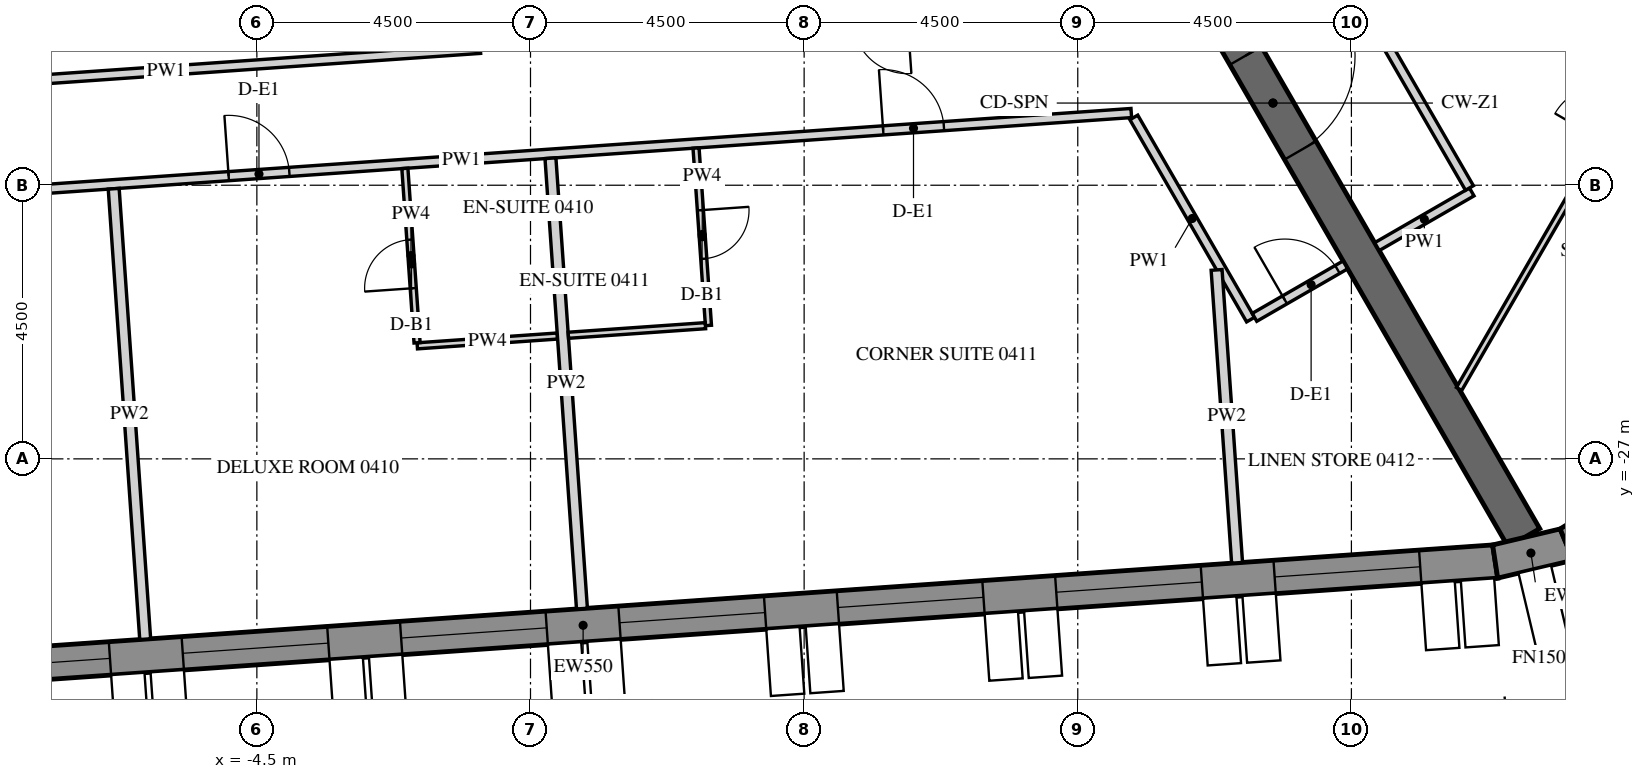
"""IFC4 building model, lengths in metres.
Left out: names, types, materials, properties, quantities, classifications, styles, units other than length and angle.
Written with IfcOpenShell. Run it as: python <this file> out.ifc"""

import sys

from ifc_helpers import new_model, si_unit, direction, frame, frame_2d, origin, place, context, subcontext, project, spatial, polyline, rectangle, outline, extrude, element, fill, save


model = new_model("IFC4")
c1 = context("Model", 3, precision=1e-05, world=origin(), true_north=direction((0.0, 1.0)))
c2 = subcontext(c1, "Body", "Model", "MODEL_VIEW")
j1 = project(units=[si_unit("LENGTHUNIT", "METRE"), si_unit("PLANEANGLEUNIT", "RADIAN")], contexts=[c1])
p1 = place(None, origin())
s1 = spatial("IfcSite", under=j1, at=p1, CompositionType="ELEMENT")
p2 = place(p1, origin())
s2 = spatial("IfcBuilding", under=s1, at=p2, CompositionType="ELEMENT")
p3 = place(p2, frame((0.0, 0.0, 68.7)))
s3 = spatial("IfcBuildingStorey", under=s2, at=p3, CompositionType="ELEMENT", Elevation=68.7)
p4 = place(p3, frame((-14.134, -30.786, -0.15), z_axis=(0.0, 0.0, 1.0), x_axis=(0.997564037441, 0.069756657061, 0.0)))
e1 = element("IfcWall", 1, at=p4, inside=s3, PredefinedType="SOLIDWALL", context=c2, shape_type="SweptSolid", body=[
    extrude(outline(polyline([(-0.026, -0.275), (30.094, -0.275), (30.049, 0.275), (0.026, 0.275), (-0.026, -0.275)])), origin(), (0.0, 0.0, 1.0), 3.9),
])
p5 = place(p4, frame((1.236, 0.0, 1.05)))
e2 = element("IfcOpeningElement", 2, at=p5, cuts=e1, PredefinedType="OPENING", context=c2, shape_type="SweptSolid", body=[
    extrude(rectangle(XDim=2.4, YDim=2.4, at=frame_2d((1.2, 1.2))), frame((0.0, 0.285, 0.0), z_axis=(0.0, -1.0, 0.0), x_axis=(1.0, 0.0, 0.0)), (0.0, 0.0, 1.0), 0.57),
])
p6 = place(p4, frame((4.835, 0.0, 1.05)))
e3 = element("IfcOpeningElement", 3, at=p6, cuts=e1, PredefinedType="OPENING", context=c2, shape_type="SweptSolid", body=[
    extrude(rectangle(XDim=2.4, YDim=2.4, at=frame_2d((1.2, 1.2))), frame((0.0, 0.285, 0.0), z_axis=(0.0, -1.0, 0.0), x_axis=(1.0, 0.0, 0.0)), (0.0, 0.0, 1.0), 0.57),
])
p7 = place(p4, frame((8.436, 0.0, 1.05)))
e4 = element("IfcOpeningElement", 4, at=p7, cuts=e1, PredefinedType="OPENING", context=c2, shape_type="SweptSolid", body=[
    extrude(rectangle(XDim=2.4, YDim=2.4, at=frame_2d((1.2, 1.2))), frame((0.0, 0.285, 0.0), z_axis=(0.0, -1.0, 0.0), x_axis=(1.0, 0.0, 0.0)), (0.0, 0.0, 1.0), 0.57),
])
p8 = place(p4, frame((12.035, 0.0, 1.05)))
e5 = element("IfcOpeningElement", 5, at=p8, cuts=e1, PredefinedType="OPENING", context=c2, shape_type="SweptSolid", body=[
    extrude(rectangle(XDim=2.4, YDim=2.4, at=frame_2d((1.2, 1.2))), frame((0.0, 0.285, 0.0), z_axis=(0.0, -1.0, 0.0), x_axis=(1.0, 0.0, 0.0)), (0.0, 0.0, 1.0), 0.57),
])
p9 = place(p4, frame((15.635, 0.0, 1.05)))
e6 = element("IfcOpeningElement", 6, at=p9, cuts=e1, PredefinedType="OPENING", context=c2, shape_type="SweptSolid", body=[
    extrude(rectangle(XDim=2.4, YDim=2.4, at=frame_2d((1.2, 1.2))), frame((0.0, 0.285, 0.0), z_axis=(0.0, -1.0, 0.0), x_axis=(1.0, 0.0, 0.0)), (0.0, 0.0, 1.0), 0.57),
])
p10 = place(p4, frame((19.236, 0.0, 1.05)))
e7 = element("IfcOpeningElement", 7, at=p10, cuts=e1, PredefinedType="OPENING", context=c2, shape_type="SweptSolid", body=[
    extrude(rectangle(XDim=2.4, YDim=2.4, at=frame_2d((1.2, 1.2))), frame((0.0, 0.285, 0.0), z_axis=(0.0, -1.0, 0.0), x_axis=(1.0, 0.0, 0.0)), (0.0, 0.0, 1.0), 0.57),
])
p11 = place(p4, frame((22.835, 0.0, 1.05)))
e8 = element("IfcOpeningElement", 8, at=p11, cuts=e1, PredefinedType="OPENING", context=c2, shape_type="SweptSolid", body=[
    extrude(rectangle(XDim=2.4, YDim=2.4, at=frame_2d((1.2, 1.2))), frame((0.0, 0.285, 0.0), z_axis=(0.0, -1.0, 0.0), x_axis=(1.0, 0.0, 0.0)), (0.0, 0.0, 1.0), 0.57),
])
p12 = place(p4, frame((26.436, 0.0, 1.05)))
e9 = element("IfcOpeningElement", 9, at=p12, cuts=e1, PredefinedType="OPENING", context=c2, shape_type="SweptSolid", body=[
    extrude(rectangle(XDim=2.4, YDim=2.4, at=frame_2d((1.2, 1.2))), frame((0.0, 0.285, 0.0), z_axis=(0.0, -1.0, 0.0), x_axis=(1.0, 0.0, 0.0)), (0.0, 0.0, 1.0), 0.57),
])
p13 = place(p3, frame((15.864, -28.688, -0.15), z_axis=(0.0, 0.0, 1.0), x_axis=(0.973063591128, 0.230536868247, 0.0)))
e10 = element("IfcWall", 10, at=p13, inside=s3, PredefinedType="SOLIDWALL", context=c2, shape_type="SweptSolid", body=[
    extrude(outline(polyline([(-0.022, -0.275), (1.253, -0.275), (1.163, 0.275), (0.022, 0.275), (-0.022, -0.275)])), origin(), (0.0, 0.0, 1.0), 3.9),
])
p14 = place(p3, frame((17.04, -28.41, -0.15), z_axis=(0.0, 0.0, 1.0), x_axis=(0.847952888306, 0.530071598195, 0.0)))
e11 = element("IfcWall", 11, at=p14, inside=s3, PredefinedType="SOLIDWALL", context=c2, shape_type="SweptSolid", body=[
    extrude(outline(polyline([(-0.045, -0.275), (1.253, -0.275), (1.163, 0.275), (0.045, 0.275), (-0.045, -0.275)])), origin(), (0.0, 0.0, 1.0), 3.9),
])
p15 = place(p3, frame((8.083, -14.0, -0.15), z_axis=(0.0, 0.0, 1.0), x_axis=(0.499997680643, -0.866026742862, 0.0)))
e12 = element("IfcWall", 12, at=p15, inside=s3, PredefinedType="SHEAR", context=c2, shape_type="SweptSolid", body=[
    extrude(rectangle(XDim=16.509, YDim=0.6, at=frame_2d((8.254, 0.0))), origin(), (0.0, 0.0, 1.0), 3.9),
])
p16 = place(p15, frame((7.354, 0.0, 0.15)))
e13 = element("IfcOpeningElement", 13, at=p16, cuts=e12, PredefinedType="OPENING", context=c2, shape_type="SweptSolid", body=[
    extrude(rectangle(XDim=1.8, YDim=2.4, at=frame_2d((0.9, 1.2))), frame((0.0, 0.31, 0.0), z_axis=(0.0, -1.0, 0.0), x_axis=(1.0, 0.0, 0.0)), (0.0, 0.0, 1.0), 0.62),
])
p17 = place(p3, frame((-12.151, -22.853, 0.0), z_axis=(0.0, 0.0, 1.0), x_axis=(0.99756425444, 0.069753553767, 0.0)))
e14 = element("IfcWall", 14, at=p17, inside=s3, PredefinedType="PARTITIONING", context=c2, shape_type="SweptSolid", body=[
    extrude(rectangle(XDim=22.085, YDim=0.15, at=frame_2d((11.042, 0.0))), origin(), (0.0, 0.0, 1.0), 2.988),
])
p18 = place(p17, frame((7.205, 0.0, 0.0)))
e15 = element("IfcOpeningElement", 15, at=p18, cuts=e14, PredefinedType="OPENING", context=c2, shape_type="SweptSolid", body=[
    extrude(rectangle(XDim=1.0, YDim=2.1, at=frame_2d((0.5, 1.05))), frame((0.0, 0.085, 0.0), z_axis=(0.0, -1.0, 0.0), x_axis=(1.0, 0.0, 0.0)), (0.0, 0.0, 1.0), 0.17),
])
p19 = place(p17, frame((17.995, 0.0, 0.0)))
e16 = element("IfcOpeningElement", 16, at=p19, cuts=e14, PredefinedType="OPENING", context=c2, shape_type="SweptSolid", body=[
    extrude(rectangle(XDim=1.0, YDim=2.1, at=frame_2d((0.5, 1.05))), frame((0.0, 0.085, 0.0), z_axis=(0.0, -1.0, 0.0), x_axis=(1.0, 0.0, 0.0)), (0.0, 0.0, 1.0), 0.17),
])
p20 = place(p3, frame((9.922, -21.385, 0.0), z_axis=(0.0, 0.0, 1.0), x_axis=(0.500023335103, -0.866011930837, 0.0)))
e17 = element("IfcWall", 17, at=p20, inside=s3, PredefinedType="PARTITIONING", context=c2, shape_type="SweptSolid", body=[
    extrude(rectangle(XDim=3.84, YDim=0.15, at=frame_2d((1.92, 0.0))), origin(), (0.0, 0.0, 1.0), 2.988),
])
p21 = place(p3, frame((11.906, -24.673, 0.0), z_axis=(0.0, 0.0, 1.0), x_axis=(0.866013532718, 0.500020560727, 0.0)))
e18 = element("IfcWall", 18, at=p21, inside=s3, PredefinedType="PARTITIONING", context=c2, shape_type="SweptSolid", body=[
    extrude(rectangle(XDim=1.725, YDim=0.15, at=frame_2d((0.863, 0.0))), origin(), (0.0, 0.0, 1.0), 2.988),
])
p22 = place(p21, frame((0.575, 0.0, 0.0)))
e19 = element("IfcOpeningElement", 19, at=p22, cuts=e18, PredefinedType="OPENING", context=c2, shape_type="SweptSolid", body=[
    extrude(rectangle(XDim=1.0, YDim=2.1, at=frame_2d((0.5, 1.05))), frame((0.0, 0.085, 0.0), z_axis=(0.0, -1.0, 0.0), x_axis=(1.0, 0.0, 0.0)), (0.0, 0.0, 1.0), 0.17),
])
p23 = place(p3, frame((-0.825, -20.257, 0.0), z_axis=(0.0, 0.0, 1.0), x_axis=(-0.9975635143, -0.069764137903, 0.0)))
e20 = element("IfcWall", 20, at=p23, inside=s3, PredefinedType="PARTITIONING", context=c2, shape_type="SweptSolid", body=[
    extrude(rectangle(XDim=10.355, YDim=0.15, at=frame_2d((5.177, 0.0))), origin(), (0.0, 0.0, 1.0), 2.988),
])
p24 = place(p3, frame((13.92, -23.51, 0.0), z_axis=(0.0, 0.0, 1.0), x_axis=(0.866047807691, 0.499961193289, 0.0)))
e21 = element("IfcWall", 21, at=p24, inside=s3, PredefinedType="PARTITIONING", context=c2, shape_type="SweptSolid", body=[
    extrude(rectangle(XDim=1.8, YDim=0.15, at=frame_2d((0.9, 0.0))), origin(), (0.0, 0.0, 1.0), 2.988),
])
p25 = place(p3, frame((15.441, -22.545, 0.0), z_axis=(0.0, 0.0, 1.0), x_axis=(-0.500037089193, 0.86600398927, 0.0)))
e22 = element("IfcWall", 22, at=p25, inside=s3, PredefinedType="PARTITIONING", context=c2, shape_type="SweptSolid", body=[
    extrude(rectangle(XDim=3.112, YDim=0.15, at=frame_2d((1.556, 0.0))), origin(), (0.0, 0.0, 1.0), 2.988),
])
p26 = place(p3, frame((-6.336, -29.965, 0.0), z_axis=(0.0, 0.0, 1.0), x_axis=(-0.06977252161, 0.997562927954, 0.0)))
e23 = element("IfcWall", 23, at=p26, inside=s3, PredefinedType="PARTITIONING", context=c2, shape_type="SweptSolid", body=[
    extrude(rectangle(XDim=7.425, YDim=0.18, at=frame_2d((3.712, 0.0))), origin(), (0.0, 0.0, 1.0), 2.988),
])
p27 = place(p3, frame((0.442, -24.98, 0.0), z_axis=(0.0, 0.0, 1.0), x_axis=(-0.997563824095, -0.069759707979, 0.0)))
e24 = element("IfcWall", 24, at=p27, inside=s3, PredefinedType="PARTITIONING", context=c2, shape_type="SweptSolid", body=[
    extrude(rectangle(XDim=2.31, YDim=0.1, at=frame_2d((1.155, 0.0))), origin(), (0.0, 0.0, 1.0), 2.988),
])
p28 = place(p3, frame((-1.865, -25.091, 0.0), z_axis=(0.0, 0.0, 1.0), x_axis=(-0.069714207611, 0.997567004896, 0.0)))
e25 = element("IfcWall", 25, at=p28, inside=s3, PredefinedType="PARTITIONING", context=c2, shape_type="SweptSolid", body=[
    extrude(rectangle(XDim=2.875, YDim=0.1, at=frame_2d((1.438, 0.0))), origin(), (0.0, 0.0, 1.0), 2.988),
])
p29 = place(p28, frame((0.9, 0.0, 0.0)))
e26 = element("IfcOpeningElement", 26, at=p29, cuts=e25, PredefinedType="OPENING", context=c2, shape_type="SweptSolid", body=[
    extrude(rectangle(XDim=0.8, YDim=2.1, at=frame_2d((0.4, 1.05))), frame((0.0, 0.06, 0.0), z_axis=(0.0, -1.0, 0.0), x_axis=(1.0, 0.0, 0.0)), (0.0, 0.0, 1.0), 0.12),
])
p30 = place(p3, frame((0.846, -29.463, 0.0), z_axis=(0.0, 0.0, 1.0), x_axis=(-0.069774810252, 0.997562767877, 0.0)))
e27 = element("IfcWall", 27, at=p30, inside=s3, PredefinedType="PARTITIONING", context=c2, shape_type="SweptSolid", body=[
    extrude(rectangle(XDim=7.425, YDim=0.18, at=frame_2d((3.712, 0.0))), origin(), (0.0, 0.0, 1.0), 2.988),
])
p31 = place(p3, frame((2.722, -21.888, 0.0), z_axis=(0.0, 0.0, 1.0), x_axis=(0.069775971057, -0.997562686683, 0.0)))
e28 = element("IfcWall", 28, at=p31, inside=s3, PredefinedType="PARTITIONING", context=c2, shape_type="SweptSolid", body=[
    extrude(rectangle(XDim=2.925, YDim=0.1, at=frame_2d((1.462, 0.0))), origin(), (0.0, 0.0, 1.0), 2.988),
])
p32 = place(p31, frame((1.025, 0.0, 0.0)))
e29 = element("IfcOpeningElement", 29, at=p32, cuts=e28, PredefinedType="OPENING", context=c2, shape_type="SweptSolid", body=[
    extrude(rectangle(XDim=0.8, YDim=2.1, at=frame_2d((0.4, 1.05))), frame((0.0, 0.06, 0.0), z_axis=(0.0, -1.0, 0.0), x_axis=(1.0, 0.0, 0.0)), (0.0, 0.0, 1.0), 0.12),
])
p33 = place(p3, frame((2.876, -24.81, 0.0), z_axis=(0.0, 0.0, 1.0), x_axis=(-0.997561825928, -0.069788275888, 0.0)))
e30 = element("IfcWall", 30, at=p33, inside=s3, PredefinedType="PARTITIONING", context=c2, shape_type="SweptSolid", body=[
    extrude(rectangle(XDim=2.26, YDim=0.1, at=frame_2d((1.13, 0.0))), origin(), (0.0, 0.0, 1.0), 2.988),
])
p34 = place(p3, frame((11.62, -28.709, 0.0), z_axis=(0.0, 0.0, 1.0), x_axis=(-0.069777301394, 0.99756259363, 0.0)))
e31 = element("IfcWall", 31, at=p34, inside=s3, PredefinedType="PARTITIONING", context=c2, shape_type="SweptSolid", body=[
    extrude(rectangle(XDim=4.828, YDim=0.18, at=frame_2d((2.414, 0.0))), origin(), (0.0, 0.0, 1.0), 2.988),
])
p35 = place(p3, frame((15.271, -25.85, 0.0), z_axis=(0.0, 0.0, 1.0), x_axis=(0.499983733712, 0.866034794927, 0.0)))
e32 = element("IfcWall", 32, at=p35, inside=s3, PredefinedType="PARTITIONING", context=c2, shape_type="SweptSolid", body=[
    extrude(rectangle(XDim=8.762, YDim=0.1, at=frame_2d((4.381, 0.0))), origin(), (0.0, 0.0, 1.0), 2.988),
])
p36 = place(p35, frame((4.712, 0.0, 0.0)))
e33 = element("IfcOpeningElement", 33, at=p36, cuts=e32, PredefinedType="OPENING", context=c2, shape_type="SweptSolid", body=[
    extrude(rectangle(XDim=0.9, YDim=2.1, at=frame_2d((0.45, 1.05))), frame((0.0, 0.06, 0.0), z_axis=(0.0, -1.0, 0.0), x_axis=(1.0, 0.0, 0.0)), (0.0, 0.0, 1.0), 0.12),
])
p37 = place(p6, frame((0.0, 0.205, 0.0)))
e34 = element("IfcWindow", 34, at=p37, inside=s3, PartitioningType="DOUBLE_PANEL_VERTICAL", PredefinedType="WINDOW", context=c2, shape_type="SweptSolid", body=[
    extrude(rectangle(XDim=2.4, YDim=2.4, at=frame_2d((1.2, 1.2))), frame((0.0, 0.03, 0.0), z_axis=(0.0, -1.0, 0.0), x_axis=(1.0, 0.0, 0.0)), (0.0, 0.0, 1.0), 0.06),
])
fill(e3, e34)
p38 = place(p7, frame((0.0, 0.205, 0.0)))
e35 = element("IfcWindow", 35, at=p38, inside=s3, PartitioningType="DOUBLE_PANEL_VERTICAL", PredefinedType="WINDOW", context=c2, shape_type="SweptSolid", body=[
    extrude(rectangle(XDim=2.4, YDim=2.4, at=frame_2d((1.2, 1.2))), frame((0.0, 0.03, 0.0), z_axis=(0.0, -1.0, 0.0), x_axis=(1.0, 0.0, 0.0)), (0.0, 0.0, 1.0), 0.06),
])
fill(e4, e35)
p39 = place(p8, frame((0.0, 0.205, 0.0)))
e36 = element("IfcWindow", 36, at=p39, inside=s3, PartitioningType="DOUBLE_PANEL_VERTICAL", PredefinedType="WINDOW", context=c2, shape_type="SweptSolid", body=[
    extrude(rectangle(XDim=2.4, YDim=2.4, at=frame_2d((1.2, 1.2))), frame((0.0, 0.03, 0.0), z_axis=(0.0, -1.0, 0.0), x_axis=(1.0, 0.0, 0.0)), (0.0, 0.0, 1.0), 0.06),
])
fill(e5, e36)
p40 = place(p9, frame((0.0, 0.205, 0.0)))
e37 = element("IfcWindow", 37, at=p40, inside=s3, PartitioningType="DOUBLE_PANEL_VERTICAL", PredefinedType="WINDOW", context=c2, shape_type="SweptSolid", body=[
    extrude(rectangle(XDim=2.4, YDim=2.4, at=frame_2d((1.2, 1.2))), frame((0.0, 0.03, 0.0), z_axis=(0.0, -1.0, 0.0), x_axis=(1.0, 0.0, 0.0)), (0.0, 0.0, 1.0), 0.06),
])
fill(e6, e37)
p41 = place(p10, frame((0.0, 0.205, 0.0)))
e38 = element("IfcWindow", 38, at=p41, inside=s3, PartitioningType="DOUBLE_PANEL_VERTICAL", PredefinedType="WINDOW", context=c2, shape_type="SweptSolid", body=[
    extrude(rectangle(XDim=2.4, YDim=2.4, at=frame_2d((1.2, 1.2))), frame((0.0, 0.03, 0.0), z_axis=(0.0, -1.0, 0.0), x_axis=(1.0, 0.0, 0.0)), (0.0, 0.0, 1.0), 0.06),
])
fill(e7, e38)
p42 = place(p11, frame((0.0, 0.205, 0.0)))
e39 = element("IfcWindow", 39, at=p42, inside=s3, PartitioningType="DOUBLE_PANEL_VERTICAL", PredefinedType="WINDOW", context=c2, shape_type="SweptSolid", body=[
    extrude(rectangle(XDim=2.4, YDim=2.4, at=frame_2d((1.2, 1.2))), frame((0.0, 0.03, 0.0), z_axis=(0.0, -1.0, 0.0), x_axis=(1.0, 0.0, 0.0)), (0.0, 0.0, 1.0), 0.06),
])
fill(e8, e39)
p43 = place(p12, frame((0.0, 0.205, 0.0)))
e40 = element("IfcWindow", 40, at=p43, inside=s3, PartitioningType="DOUBLE_PANEL_VERTICAL", PredefinedType="WINDOW", context=c2, shape_type="SweptSolid", body=[
    extrude(rectangle(XDim=2.4, YDim=2.4, at=frame_2d((1.2, 1.2))), frame((0.0, 0.03, 0.0), z_axis=(0.0, -1.0, 0.0), x_axis=(1.0, 0.0, 0.0)), (0.0, 0.0, 1.0), 0.06),
])
fill(e9, e40)
p44 = place(p16, origin())
e41 = element("IfcDoor", 41, at=p44, inside=s3, OperationType="DOUBLE_DOOR_SINGLE_SWING", PredefinedType="DOOR", context=c2, shape_type="SweptSolid", body=[
    extrude(rectangle(XDim=1.8, YDim=2.4, at=frame_2d((0.9, 1.2))), frame((0.0, 0.025, 0.0), z_axis=(0.0, -1.0, 0.0), x_axis=(1.0, 0.0, 0.0)), (0.0, 0.0, 1.0), 0.05),
])
fill(e13, e41)
p45 = place(p18, origin())
e42 = element("IfcDoor", 42, at=p45, inside=s3, OperationType="SINGLE_SWING_LEFT", PredefinedType="DOOR", context=c2, shape_type="SweptSolid", body=[
    extrude(rectangle(XDim=1.0, YDim=2.1, at=frame_2d((0.5, 1.05))), frame((0.0, 0.025, 0.0), z_axis=(0.0, -1.0, 0.0), x_axis=(1.0, 0.0, 0.0)), (0.0, 0.0, 1.0), 0.05),
])
fill(e15, e42)
p46 = place(p29, origin())
e43 = element("IfcDoor", 43, at=p46, inside=s3, OperationType="SINGLE_SWING_RIGHT", PredefinedType="DOOR", context=c2, shape_type="SweptSolid", body=[
    extrude(rectangle(XDim=0.8, YDim=2.1, at=frame_2d((0.4, 1.05))), frame((0.0, 0.025, 0.0), z_axis=(0.0, -1.0, 0.0), x_axis=(1.0, 0.0, 0.0)), (0.0, 0.0, 1.0), 0.05),
])
fill(e26, e43)
p47 = place(p19, origin())
e44 = element("IfcDoor", 44, at=p47, inside=s3, OperationType="SINGLE_SWING_LEFT", PredefinedType="DOOR", context=c2, shape_type="SweptSolid", body=[
    extrude(rectangle(XDim=1.0, YDim=2.1, at=frame_2d((0.5, 1.05))), frame((0.0, 0.025, 0.0), z_axis=(0.0, -1.0, 0.0), x_axis=(1.0, 0.0, 0.0)), (0.0, 0.0, 1.0), 0.05),
])
fill(e16, e44)
p48 = place(p32, origin())
e45 = element("IfcDoor", 45, at=p48, inside=s3, OperationType="SINGLE_SWING_RIGHT", PredefinedType="DOOR", context=c2, shape_type="SweptSolid", body=[
    extrude(rectangle(XDim=0.8, YDim=2.1, at=frame_2d((0.4, 1.05))), frame((0.0, 0.025, 0.0), z_axis=(0.0, -1.0, 0.0), x_axis=(1.0, 0.0, 0.0)), (0.0, 0.0, 1.0), 0.05),
])
fill(e29, e45)
p49 = place(p22, origin())
e46 = element("IfcDoor", 46, at=p49, inside=s3, OperationType="SINGLE_SWING_LEFT", PredefinedType="DOOR", context=c2, shape_type="SweptSolid", body=[
    extrude(rectangle(XDim=1.0, YDim=2.1, at=frame_2d((0.5, 1.05))), frame((0.0, 0.025, 0.0), z_axis=(0.0, -1.0, 0.0), x_axis=(1.0, 0.0, 0.0)), (0.0, 0.0, 1.0), 0.05),
])
fill(e19, e46)
save(model, sys.argv[1])
